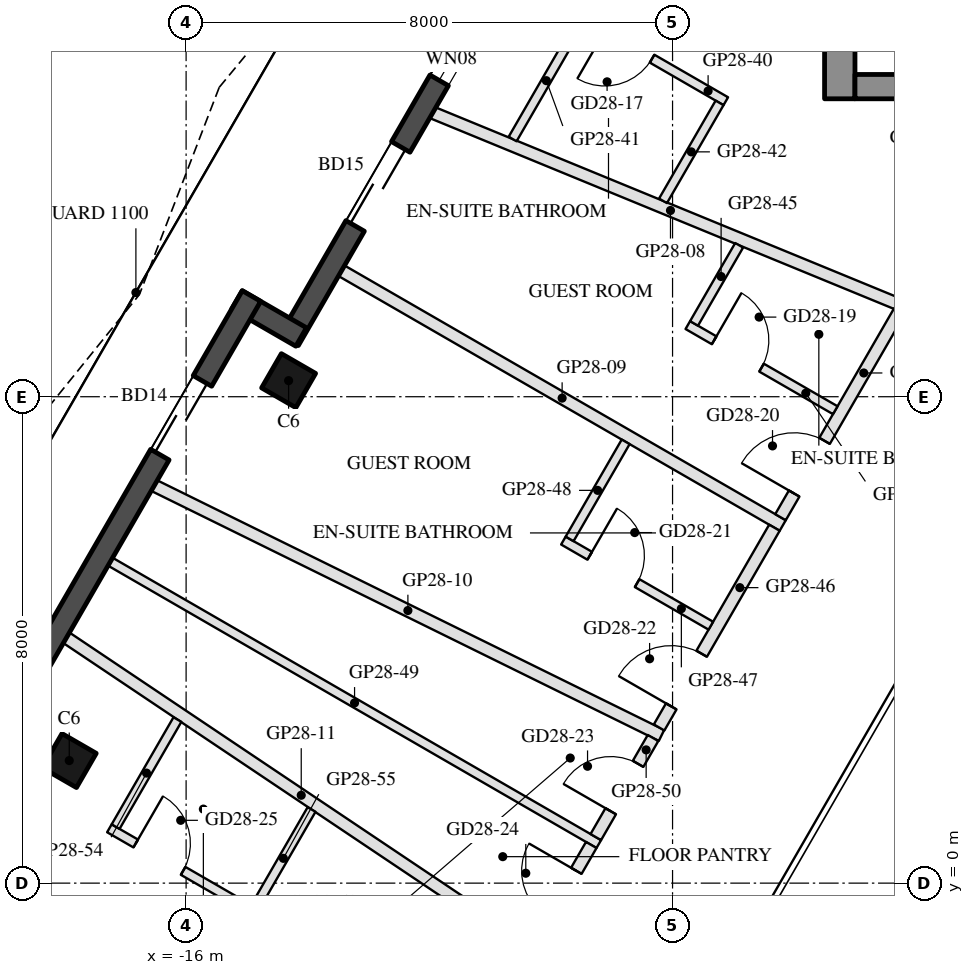
"""IFC4 building model, lengths in metres.
Left out: names, types, materials, properties, quantities, classifications, styles, units other than length and angle.
Written with IfcOpenShell. Run it as: python <this file> out.ifc"""

import sys

from ifc_helpers import new_model, si_unit, direction, frame, frame_2d, origin, origin_2d, place, context, subcontext, project, spatial, rectangle, hollow_rectangle, extrude, boolean, halfspace, element, fill, save


model = new_model("IFC4")
c1 = context("Model", 3, precision=1e-05, world=origin(), true_north=direction((0.0, 1.0)))
c2 = subcontext(c1, "Body", "Model", "MODEL_VIEW")
j1 = project(units=[si_unit("LENGTHUNIT", "METRE"), si_unit("PLANEANGLEUNIT", "RADIAN")], contexts=[c1])
p1 = place(None, origin())
s1 = spatial("IfcSite", under=j1, at=p1, CompositionType="ELEMENT")
p2 = place(p1, origin())
s2 = spatial("IfcBuilding", under=s1, at=p2, CompositionType="ELEMENT")
p3 = place(p2, frame((0.0, 0.0, 280.0)))
s3 = spatial("IfcBuildingStorey", under=s2, at=p3, CompositionType="ELEMENT", Elevation=280.0)
p4 = place(p3, frame((-14.314, 8.264, 0.0), z_axis=(0.0, 0.0, 1.0), x_axis=(0.5, 0.866025403784, 0.0)))
e1 = element("IfcColumn", 1, at=p4, inside=s3, PredefinedType="COLUMN", context=c2, shape_type="SweptSolid", body=[
    boolean("DIFFERENCE", extrude(hollow_rectangle(XDim=0.65, YDim=0.65, WallThickness=0.03, at=origin_2d()), origin(), (0.0, 0.0, 1.0), 3.7), halfspace(frame((0.0, 0.0, 0.037), z_axis=(0.0, 0.0, 1.0), x_axis=(1.0, 0.0, 0.0)), True)),
])
p5 = place(p3, frame((-17.922, 2.016, 0.0), z_axis=(0.0, 0.0, 1.0), x_axis=(0.5, 0.866025403784, 0.0)))
e2 = element("IfcColumn", 2, at=p5, inside=s3, PredefinedType="COLUMN", context=c2, shape_type="SweptSolid", body=[
    boolean("DIFFERENCE", extrude(hollow_rectangle(XDim=0.65, YDim=0.65, WallThickness=0.03, at=origin_2d()), origin(), (0.0, 0.0, 1.0), 3.7), halfspace(frame((0.0, 0.0, 0.04), z_axis=(0.0, 0.0, 1.0), x_axis=(1.0, 0.0, 0.0)), True)),
])
p6 = place(p3, frame((-11.278, 14.173, 0.0), z_axis=(0.0, 0.0, 1.0), x_axis=(-0.499985371027, -0.866033849661, 0.0)))
e3 = element("IfcWall", 3, at=p6, inside=s3, PredefinedType="SOLIDWALL", context=c2, shape_type="SweptSolid", body=[
    extrude(rectangle(XDim=6.055, YDim=0.35, at=frame_2d((3.028, 0.0))), origin(), (0.0, 0.0, 1.0), 3.55),
])
p7 = place(p6, frame((0.32, 0.0, 0.3)))
e4 = element("IfcOpeningElement", 4, at=p7, cuts=e3, PredefinedType="OPENING", context=c2, shape_type="SweptSolid", body=[
    extrude(rectangle(XDim=0.8, YDim=2.65, at=frame_2d((0.4, 1.325))), frame((0.0, 0.185, 0.0), z_axis=(0.0, -1.0, 0.0), x_axis=(1.0, 0.0, 0.0)), (0.0, 0.0, 1.0), 0.37),
])
p8 = place(p6, frame((2.384, 0.0, 0.0)))
e5 = element("IfcOpeningElement", 5, at=p8, cuts=e3, PredefinedType="OPENING", context=c2, shape_type="SweptSolid", body=[
    extrude(rectangle(XDim=1.5, YDim=2.4, at=frame_2d((0.75, 1.2))), frame((0.0, 0.185, 0.0), z_axis=(0.0, -1.0, 0.0), x_axis=(1.0, 0.0, 0.0)), (0.0, 0.0, 1.0), 0.37),
])
p9 = place(p3, frame((-14.108, 8.982, 0.0), z_axis=(0.0, 0.0, 1.0), x_axis=(-0.866005645448, 0.500034220881, 0.0)))
e6 = element("IfcWall", 6, at=p9, inside=s3, PredefinedType="SOLIDWALL", context=c2, shape_type="SweptSolid", body=[
    extrude(rectangle(XDim=1.22, YDim=0.35, at=frame_2d((0.61, 0.0))), origin(), (0.0, 0.0, 1.0), 3.55),
])
p10 = place(p3, frame((-14.925, 9.656, 0.0), z_axis=(0.0, 0.0, 1.0), x_axis=(-0.500018599098, -0.866014665324, 0.0)))
e7 = element("IfcWall", 7, at=p10, inside=s3, PredefinedType="SOLIDWALL", context=c2, shape_type="SweptSolid", body=[
    extrude(rectangle(XDim=9.015, YDim=0.35, at=frame_2d((4.508, 0.0))), origin(), (0.0, 0.0, 1.0), 3.55),
])
p11 = place(p10, frame((1.613, 0.0, 0.0)))
e8 = element("IfcOpeningElement", 8, at=p11, cuts=e7, PredefinedType="OPENING", context=c2, shape_type="SweptSolid", body=[
    extrude(rectangle(XDim=1.4, YDim=2.4, at=frame_2d((0.7, 1.2))), frame((0.0, 0.185, 0.0), z_axis=(0.0, -1.0, 0.0), x_axis=(1.0, 0.0, 0.0)), (0.0, 0.0, 1.0), 0.37),
])
p12 = place(p3, frame((-5.25, 12.9, 0.0), z_axis=(0.0, 0.0, 1.0), x_axis=(0.0, 1.0, 0.0)))
e9 = element("IfcWall", 9, at=p12, inside=s3, PredefinedType="SHEAR", context=c2, shape_type="SweptSolid", body=[
    extrude(rectangle(XDim=12.129, YDim=0.5, at=frame_2d((6.064, 0.0))), origin(), (0.0, 0.0, 1.0), 3.5),
])
p13 = place(p3, frame((5.0, 13.1, 0.0), z_axis=(0.0, 0.0, 1.0), x_axis=(-1.0, 0.0, 0.0)))
e10 = element("IfcWall", 10, at=p13, inside=s3, PredefinedType="SHEAR", context=c2, shape_type="SweptSolid", body=[
    extrude(rectangle(XDim=10.0, YDim=0.4, at=frame_2d((5.0, 0.0))), origin(), (0.0, 0.0, 1.0), 3.5),
])
p14 = place(p13, frame((3.55, 0.0, 0.0)))
e11 = element("IfcOpeningElement", 11, at=p14, cuts=e10, PredefinedType="OPENING", context=c2, shape_type="SweptSolid", body=[
    extrude(rectangle(XDim=1.1, YDim=2.1, at=frame_2d((0.55, 1.05))), frame((0.0, 0.21, 0.0), z_axis=(0.0, -1.0, 0.0), x_axis=(1.0, 0.0, 0.0)), (0.0, 0.0, 1.0), 0.42),
])
p15 = place(p13, frame((5.85, 0.0, 0.0)))
e12 = element("IfcOpeningElement", 12, at=p15, cuts=e10, PredefinedType="OPENING", context=c2, shape_type="SweptSolid", body=[
    extrude(rectangle(XDim=1.4, YDim=2.1, at=frame_2d((0.7, 1.05))), frame((0.0, 0.21, 0.0), z_axis=(0.0, -1.0, 0.0), x_axis=(1.0, 0.0, 0.0)), (0.0, 0.0, 1.0), 0.42),
])
p16 = place(p3, frame((-11.944, 12.67, 0.0), z_axis=(0.0, 0.0, 1.0), x_axis=(0.924897439871, -0.380216682591, 0.0)))
e13 = element("IfcWall", 13, at=p16, inside=s3, PredefinedType="PARTITIONING", context=c2, shape_type="SweptSolid", body=[
    extrude(rectangle(XDim=8.454, YDim=0.2, at=frame_2d((4.227, 0.0))), origin(), (0.0, 0.0, 1.0), 3.16),
])
p17 = place(p3, frame((-13.444, 10.071, 0.0), z_axis=(0.0, 0.0, 1.0), x_axis=(0.866030795796, -0.499990660646, 0.0)))
e14 = element("IfcWall", 14, at=p17, inside=s3, PredefinedType="PARTITIONING", context=c2, shape_type="SweptSolid", body=[
    extrude(rectangle(XDim=8.379, YDim=0.2, at=frame_2d((4.189, 0.0))), origin(), (0.0, 0.0, 1.0), 3.16),
])
p18 = place(p3, frame((-16.524, 6.538, 0.0), z_axis=(0.0, 0.0, 1.0), x_axis=(0.897120251728, -0.441786434762, 0.0)))
e15 = element("IfcWall", 15, at=p18, inside=s3, PredefinedType="PARTITIONING", context=c2, shape_type="SweptSolid", body=[
    extrude(rectangle(XDim=9.299, YDim=0.2, at=frame_2d((4.649, 0.0))), origin(), (0.0, 0.0, 1.0), 3.16),
])
p19 = place(p3, frame((-17.969, 4.035, 0.0), z_axis=(0.0, 0.0, 1.0), x_axis=(0.830560992963, -0.556927676604, 0.0)))
e16 = element("IfcWall", 16, at=p19, inside=s3, PredefinedType="PARTITIONING", context=c2, shape_type="SweptSolid", body=[
    extrude(rectangle(XDim=9.3, YDim=0.2, at=frame_2d((4.65, 0.0))), origin(), (0.0, 0.0, 1.0), 3.16),
])
p20 = place(p3, frame((-7.125, 12.86, 0.0), z_axis=(0.0, 0.0, 1.0), x_axis=(-0.866034573852, 0.49998411664, 0.0)))
e17 = element("IfcWall", 17, at=p20, inside=s3, PredefinedType="PARTITIONING", context=c2, shape_type="SweptSolid", body=[
    extrude(rectangle(XDim=2.8, YDim=0.15, at=frame_2d((1.4, 0.0))), origin(), (0.0, 0.0, 1.0), 3.55),
])
p21 = place(p20, frame((1.4, 0.0, 0.0)))
e18 = element("IfcOpeningElement", 18, at=p21, cuts=e17, PredefinedType="OPENING", context=c2, shape_type="SweptSolid", body=[
    extrude(rectangle(XDim=0.9, YDim=2.1, at=frame_2d((0.45, 1.05))), frame((0.0, 0.085, 0.0), z_axis=(0.0, -1.0, 0.0), x_axis=(1.0, 0.0, 0.0)), (0.0, 0.0, 1.0), 0.17),
])
p22 = place(p3, frame((-9.522, 14.158, 0.0), z_axis=(0.0, 0.0, 1.0), x_axis=(-0.49990681678, -0.866079196458, 0.0)))
e19 = element("IfcWall", 19, at=p22, inside=s3, PredefinedType="PARTITIONING", context=c2, shape_type="SweptSolid", body=[
    extrude(rectangle(XDim=2.216, YDim=0.15, at=frame_2d((1.108, 0.0))), origin(), (0.0, 0.0, 1.0), 3.05),
])
p23 = place(p3, frame((-7.227, 12.833, 0.0), z_axis=(0.0, 0.0, 1.0), x_axis=(-0.500063286585, -0.865988862174, 0.0)))
e20 = element("IfcWall", 20, at=p23, inside=s3, PredefinedType="PARTITIONING", context=c2, shape_type="SweptSolid", body=[
    extrude(rectangle(XDim=1.86, YDim=0.15, at=frame_2d((0.93, 0.0))), origin(), (0.0, 0.0, 1.0), 3.05),
])
p24 = place(p3, frame((-6.225, 6.019, 0.0), z_axis=(0.0, 0.0, 1.0), x_axis=(0.500024943202, 0.866011002341, 0.0)))
e21 = element("IfcWall", 21, at=p24, inside=s3, PredefinedType="PARTITIONING", context=c2, shape_type="SweptSolid", body=[
    extrude(rectangle(XDim=3.912, YDim=0.2, at=frame_2d((1.956, 0.0))), origin(), (0.0, 0.0, 1.0), 3.05),
])
p25 = place(p24, frame((0.449, 0.0, 0.0)))
e22 = element("IfcOpeningElement", 22, at=p25, cuts=e21, PredefinedType="OPENING", context=c2, shape_type="SweptSolid", body=[
    extrude(rectangle(XDim=1.0, YDim=2.1, at=frame_2d((0.5, 1.05))), frame((0.0, 0.11, 0.0), z_axis=(0.0, -1.0, 0.0), x_axis=(1.0, 0.0, 0.0)), (0.0, 0.0, 1.0), 0.22),
])
p26 = place(p3, frame((-7.749, 9.178, 0.0), z_axis=(0.0, 0.0, 1.0), x_axis=(0.866034573852, -0.49998411664, 0.0)))
e23 = element("IfcWall", 23, at=p26, inside=s3, PredefinedType="PARTITIONING", context=c2, shape_type="SweptSolid", body=[
    extrude(rectangle(XDim=2.8, YDim=0.15, at=frame_2d((1.4, 0.0))), origin(), (0.0, 0.0, 1.0), 3.55),
])
p27 = place(p26, frame((0.5, 0.0, 0.0)))
e24 = element("IfcOpeningElement", 24, at=p27, cuts=e23, PredefinedType="OPENING", context=c2, shape_type="SweptSolid", body=[
    extrude(rectangle(XDim=0.9, YDim=2.1, at=frame_2d((0.45, 1.05))), frame((0.0, 0.085, 0.0), z_axis=(0.0, -1.0, 0.0), x_axis=(1.0, 0.0, 0.0)), (0.0, 0.0, 1.0), 0.17),
])
p28 = place(p3, frame((-6.905, 10.491, 0.0), z_axis=(0.0, 0.0, 1.0), x_axis=(-0.499926630096, -0.866067759775, 0.0)))
e25 = element("IfcWall", 25, at=p28, inside=s3, PredefinedType="PARTITIONING", context=c2, shape_type="SweptSolid", body=[
    extrude(rectangle(XDim=1.484, YDim=0.15, at=frame_2d((0.742, 0.0))), origin(), (0.0, 0.0, 1.0), 3.55),
])
p29 = place(p3, frame((-8.221, 2.561, 0.0), z_axis=(0.0, 0.0, 1.0), x_axis=(0.499988034227, 0.866032312117, 0.0)))
e26 = element("IfcWall", 26, at=p29, inside=s3, PredefinedType="PARTITIONING", context=c2, shape_type="SweptSolid", body=[
    extrude(rectangle(XDim=3.793, YDim=0.2, at=frame_2d((1.896, 0.0))), origin(), (0.0, 0.0, 1.0), 3.05),
])
p30 = place(p29, frame((0.4, 0.0, 0.0)))
e27 = element("IfcOpeningElement", 27, at=p30, cuts=e26, PredefinedType="OPENING", context=c2, shape_type="SweptSolid", body=[
    extrude(rectangle(XDim=1.0, YDim=2.1, at=frame_2d((0.5, 1.05))), frame((0.0, 0.11, 0.0), z_axis=(0.0, -1.0, 0.0), x_axis=(1.0, 0.0, 0.0)), (0.0, 0.0, 1.0), 0.22),
])
p31 = place(p3, frame((-9.795, 5.634, 0.0), z_axis=(0.0, 0.0, 1.0), x_axis=(0.866034573852, -0.49998411664, 0.0)))
e28 = element("IfcWall", 28, at=p31, inside=s3, PredefinedType="PARTITIONING", context=c2, shape_type="SweptSolid", body=[
    extrude(rectangle(XDim=2.8, YDim=0.15, at=frame_2d((1.4, 0.0))), origin(), (0.0, 0.0, 1.0), 3.05),
])
p32 = place(p31, frame((0.5, 0.0, 0.0)))
e29 = element("IfcOpeningElement", 29, at=p32, cuts=e28, PredefinedType="OPENING", context=c2, shape_type="SweptSolid", body=[
    extrude(rectangle(XDim=0.9, YDim=2.1, at=frame_2d((0.45, 1.05))), frame((0.0, 0.085, 0.0), z_axis=(0.0, -1.0, 0.0), x_axis=(1.0, 0.0, 0.0)), (0.0, 0.0, 1.0), 0.17),
])
p33 = place(p3, frame((-8.771, 7.258, 0.0), z_axis=(0.0, 0.0, 1.0), x_axis=(-0.50002820729, -0.866009117685, 0.0)))
e30 = element("IfcWall", 30, at=p33, inside=s3, PredefinedType="PARTITIONING", context=c2, shape_type="SweptSolid", body=[
    extrude(rectangle(XDim=1.843, YDim=0.15, at=frame_2d((0.922, 0.0))), origin(), (0.0, 0.0, 1.0), 3.05),
])
p34 = place(p3, frame((-17.246, 5.286, 0.0), z_axis=(0.0, 0.0, 1.0), x_axis=(0.865746766399, -0.500482303853, 0.0)))
e31 = element("IfcWall", 31, at=p34, inside=s3, PredefinedType="PARTITIONING", context=c2, shape_type="SweptSolid", body=[
    extrude(rectangle(XDim=9.279, YDim=0.15, at=frame_2d((4.639, 0.0))), origin(), (0.0, 0.0, 1.0), 3.16),
])
p35 = place(p3, frame((-9.262, 0.758, 0.0), z_axis=(0.0, 0.0, 1.0), x_axis=(0.500074377092, 0.865982457891, 0.0)))
e32 = element("IfcWall", 32, at=p35, inside=s3, PredefinedType="PARTITIONING", context=c2, shape_type="SweptSolid", body=[
    extrude(rectangle(XDim=1.882, YDim=0.2, at=frame_2d((0.941, 0.0))), origin(), (0.0, 0.0, 1.0), 3.05),
])
p36 = place(p35, frame((0.491, 0.0, 0.0)))
e33 = element("IfcOpeningElement", 33, at=p36, cuts=e32, PredefinedType="OPENING", context=c2, shape_type="SweptSolid", body=[
    extrude(rectangle(XDim=0.9, YDim=2.1, at=frame_2d((0.45, 1.05))), frame((0.0, 0.11, 0.0), z_axis=(0.0, -1.0, 0.0), x_axis=(1.0, 0.0, 0.0)), (0.0, 0.0, 1.0), 0.22),
])
p37 = place(p3, frame((-10.278, -1.002, 0.0), z_axis=(0.0, 0.0, 1.0), x_axis=(0.499977061294, 0.866038647048, 0.0)))
e34 = element("IfcWall", 34, at=p37, inside=s3, PredefinedType="PARTITIONING", context=c2, shape_type="SweptSolid", body=[
    extrude(rectangle(XDim=1.881, YDim=0.2, at=frame_2d((0.941, 0.0))), origin(), (0.0, 0.0, 1.0), 3.55),
])
p38 = place(p37, frame((0.491, 0.0, 0.0)))
e35 = element("IfcOpeningElement", 35, at=p38, cuts=e34, PredefinedType="OPENING", context=c2, shape_type="SweptSolid", body=[
    extrude(rectangle(XDim=0.9, YDim=2.1, at=frame_2d((0.45, 1.05))), frame((0.0, 0.11, 0.0), z_axis=(0.0, -1.0, 0.0), x_axis=(1.0, 0.0, 0.0)), (0.0, 0.0, 1.0), 0.22),
])
p39 = place(p3, frame((-17.262, 0.902, 0.0), z_axis=(0.0, 0.0, 1.0), x_axis=(0.866034573852, -0.49998411664, 0.0)))
e36 = element("IfcWall", 36, at=p39, inside=s3, PredefinedType="PARTITIONING", context=c2, shape_type="SweptSolid", body=[
    extrude(rectangle(XDim=2.8, YDim=0.15, at=frame_2d((1.4, 0.0))), origin(), (0.0, 0.0, 1.0), 3.55),
])
p40 = place(p39, frame((0.5, 0.0, 0.0)))
e37 = element("IfcOpeningElement", 37, at=p40, cuts=e36, PredefinedType="OPENING", context=c2, shape_type="SweptSolid", body=[
    extrude(rectangle(XDim=0.9, YDim=2.1, at=frame_2d((0.45, 1.05))), frame((0.0, 0.085, 0.0), z_axis=(0.0, -1.0, 0.0), x_axis=(1.0, 0.0, 0.0)), (0.0, 0.0, 1.0), 0.17),
])
p41 = place(p3, frame((-16.143, 2.69, 0.0), z_axis=(0.0, 0.0, 1.0), x_axis=(-0.500013496215, -0.866017611601, 0.0)))
e38 = element("IfcWall", 38, at=p41, inside=s3, PredefinedType="PARTITIONING", context=c2, shape_type="SweptSolid", body=[
    extrude(rectangle(XDim=2.033, YDim=0.15, at=frame_2d((1.017, 0.0))), origin(), (0.0, 0.0, 1.0), 3.05),
])
p42 = place(p3, frame((-13.937, 1.211, 0.0), z_axis=(0.0, 0.0, 1.0), x_axis=(-0.500003477455, -0.866023396066, 0.0)))
e39 = element("IfcWall", 39, at=p42, inside=s3, PredefinedType="PARTITIONING", context=c2, shape_type="SweptSolid", body=[
    extrude(rectangle(XDim=1.855, YDim=0.15, at=frame_2d((0.927, 0.0))), origin(), (0.0, 0.0, 1.0), 3.05),
])
p43 = place(p7, origin())
e40 = element("IfcWindow", 40, at=p43, inside=s3, PartitioningType="SINGLE_PANEL", PredefinedType="WINDOW", context=c2, shape_type="SweptSolid", body=[
    extrude(rectangle(XDim=0.8, YDim=2.65, at=frame_2d((0.4, 1.325))), frame((0.0, 0.03, 0.0), z_axis=(0.0, -1.0, 0.0), x_axis=(1.0, 0.0, 0.0)), (0.0, 0.0, 1.0), 0.06),
])
fill(e4, e40)
p44 = place(p8, frame((1.5, 0.0, 0.0), z_axis=(0.0, 0.0, 1.0), x_axis=(-1.0, 0.0, 0.0)))
e41 = element("IfcDoor", 41, at=p44, inside=s3, OperationType="SLIDING_TO_LEFT", PredefinedType="DOOR", context=c2, shape_type="SweptSolid", body=[
    extrude(rectangle(XDim=1.5, YDim=2.4, at=frame_2d((0.75, 1.2))), frame((0.0, 0.025, 0.0), z_axis=(0.0, -1.0, 0.0), x_axis=(1.0, 0.0, 0.0)), (0.0, 0.0, 1.0), 0.05),
])
fill(e5, e41)
p45 = place(p11, frame((1.4, 0.0, 0.0), z_axis=(0.0, 0.0, 1.0), x_axis=(-1.0, 0.0, 0.0)))
e42 = element("IfcDoor", 42, at=p45, inside=s3, OperationType="SLIDING_TO_LEFT", PredefinedType="DOOR", context=c2, shape_type="SweptSolid", body=[
    extrude(rectangle(XDim=1.4, YDim=2.4, at=frame_2d((0.7, 1.2))), frame((0.0, 0.025, 0.0), z_axis=(0.0, -1.0, 0.0), x_axis=(1.0, 0.0, 0.0)), (0.0, 0.0, 1.0), 0.05),
])
fill(e8, e42)
p46 = place(p21, origin())
e43 = element("IfcDoor", 43, at=p46, inside=s3, OperationType="SINGLE_SWING_RIGHT", PredefinedType="DOOR", context=c2, shape_type="SweptSolid", body=[
    extrude(rectangle(XDim=0.9, YDim=2.1, at=frame_2d((0.45, 1.05))), frame((0.0, 0.025, 0.0), z_axis=(0.0, -1.0, 0.0), x_axis=(1.0, 0.0, 0.0)), (0.0, 0.0, 1.0), 0.05),
])
fill(e18, e43)
p47 = place(p27, origin())
e44 = element("IfcDoor", 44, at=p47, inside=s3, OperationType="SINGLE_SWING_LEFT", PredefinedType="DOOR", context=c2, shape_type="SweptSolid", body=[
    extrude(rectangle(XDim=0.9, YDim=2.1, at=frame_2d((0.45, 1.05))), frame((0.0, 0.025, 0.0), z_axis=(0.0, -1.0, 0.0), x_axis=(1.0, 0.0, 0.0)), (0.0, 0.0, 1.0), 0.05),
])
fill(e24, e44)
p48 = place(p25, origin())
e45 = element("IfcDoor", 45, at=p48, inside=s3, OperationType="SINGLE_SWING_LEFT", PredefinedType="DOOR", context=c2, shape_type="SweptSolid", body=[
    extrude(rectangle(XDim=1.0, YDim=2.1, at=frame_2d((0.5, 1.05))), frame((0.0, 0.025, 0.0), z_axis=(0.0, -1.0, 0.0), x_axis=(1.0, 0.0, 0.0)), (0.0, 0.0, 1.0), 0.05),
])
fill(e22, e45)
p49 = place(p32, origin())
e46 = element("IfcDoor", 46, at=p49, inside=s3, OperationType="SINGLE_SWING_LEFT", PredefinedType="DOOR", context=c2, shape_type="SweptSolid", body=[
    extrude(rectangle(XDim=0.9, YDim=2.1, at=frame_2d((0.45, 1.05))), frame((0.0, 0.025, 0.0), z_axis=(0.0, -1.0, 0.0), x_axis=(1.0, 0.0, 0.0)), (0.0, 0.0, 1.0), 0.05),
])
fill(e29, e46)
p50 = place(p30, origin())
e47 = element("IfcDoor", 47, at=p50, inside=s3, OperationType="SINGLE_SWING_LEFT", PredefinedType="DOOR", context=c2, shape_type="SweptSolid", body=[
    extrude(rectangle(XDim=1.0, YDim=2.1, at=frame_2d((0.5, 1.05))), frame((0.0, 0.025, 0.0), z_axis=(0.0, -1.0, 0.0), x_axis=(1.0, 0.0, 0.0)), (0.0, 0.0, 1.0), 0.05),
])
fill(e27, e47)
p51 = place(p36, origin())
e48 = element("IfcDoor", 48, at=p51, inside=s3, OperationType="SINGLE_SWING_LEFT", PredefinedType="DOOR", context=c2, shape_type="SweptSolid", body=[
    extrude(rectangle(XDim=0.9, YDim=2.1, at=frame_2d((0.45, 1.05))), frame((0.0, 0.025, 0.0), z_axis=(0.0, -1.0, 0.0), x_axis=(1.0, 0.0, 0.0)), (0.0, 0.0, 1.0), 0.05),
])
fill(e33, e48)
p52 = place(p38, origin())
e49 = element("IfcDoor", 49, at=p52, inside=s3, OperationType="SINGLE_SWING_RIGHT", PredefinedType="DOOR", context=c2, shape_type="SweptSolid", body=[
    extrude(rectangle(XDim=0.9, YDim=2.1, at=frame_2d((0.45, 1.05))), frame((0.0, 0.025, 0.0), z_axis=(0.0, -1.0, 0.0), x_axis=(1.0, 0.0, 0.0)), (0.0, 0.0, 1.0), 0.05),
])
fill(e35, e49)
p53 = place(p40, origin())
e50 = element("IfcDoor", 50, at=p53, inside=s3, OperationType="SINGLE_SWING_LEFT", PredefinedType="DOOR", context=c2, shape_type="SweptSolid", body=[
    extrude(rectangle(XDim=0.9, YDim=2.1, at=frame_2d((0.45, 1.05))), frame((0.0, 0.025, 0.0), z_axis=(0.0, -1.0, 0.0), x_axis=(1.0, 0.0, 0.0)), (0.0, 0.0, 1.0), 0.05),
])
fill(e37, e50)
save(model, sys.argv[1])
